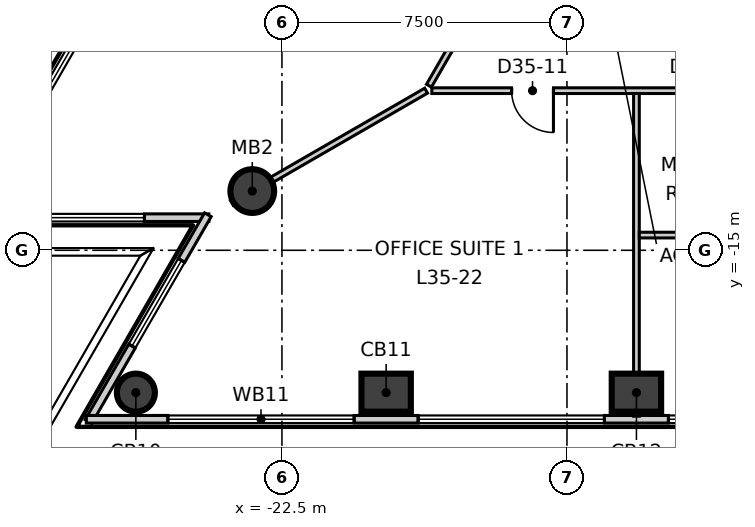
"""IFC4 building model, lengths in metres.
Left out: names, types, materials, properties, quantities, classifications, styles, units other than length and angle.
Written with IfcOpenShell. Run it as: python <this file> out.ifc"""

import sys

from ifc_helpers import new_model, si_unit, direction, frame, frame_2d, origin, origin_2d, place, context, subcontext, project, spatial, rectangle, circle, extrude, element, fill, save


model = new_model("IFC4")
c1 = context("Model", 3, precision=1e-05, world=origin(), true_north=direction((0.0, 1.0)))
c2 = subcontext(c1, "Body", "Model", "MODEL_VIEW")
j1 = project(units=[si_unit("LENGTHUNIT", "METRE"), si_unit("PLANEANGLEUNIT", "RADIAN")], contexts=[c1])
p1 = place(None, origin())
s1 = spatial("IfcSite", under=j1, at=p1, CompositionType="ELEMENT")
p2 = place(p1, origin())
s2 = spatial("IfcBuilding", under=s1, at=p2, CompositionType="ELEMENT")
p3 = place(p2, frame((0.0, 0.0, 152.3)))
s3 = spatial("IfcBuildingStorey", under=s2, at=p3, CompositionType="ELEMENT", Elevation=152.3)
p4 = place(p3, frame((-26.344, -18.746, -0.3), z_axis=(0.0, 0.0, 1.0), x_axis=(1.0, 0.0, 0.0)))
e1 = element("IfcColumn", 1, at=p4, inside=s3, PredefinedType="COLUMN", context=c2, shape_type="SweptSolid", body=[
    extrude(circle(Radius=0.5, at=origin_2d()), origin(), (0.0, 0.0, 1.0), 4.0),
])
for number, where, z_axis, x_axis in (
    (2, (-19.758, -18.746, -0.3), (0.0, 0.0, 1.0), (1.0, 0.0, 0.0)),
    (3, (-13.172, -18.746, -0.3), (0.0, 0.0, 1.0), (1.0, 0.0, 0.0)),
):
    element("IfcColumn", number, at=place(p3, frame(where, z_axis=z_axis, x_axis=x_axis)), inside=s3, PredefinedType="COLUMN", context=c2, shape_type="SweptSolid", body=[
        extrude(rectangle(XDim=1.3, YDim=1.0, at=origin_2d()), origin(), (0.0, 0.0, 1.0), 4.0),
    ])
p5 = place(p3, frame((-23.281, -13.442, -0.3), z_axis=(0.0, 0.0, 1.0), x_axis=(1.0, 0.0, 0.0)))
e4 = element("IfcColumn", 4, at=p5, inside=s3, PredefinedType="COLUMN", context=c2, shape_type="SweptSolid", body=[
    extrude(circle(Radius=0.575, at=origin_2d()), origin(), (0.0, 0.0, 1.0), 4.0),
])
p6 = place(p3, frame((-3.018, 33.666, 0.0), z_axis=(0.0, 0.0, 1.0), x_axis=(-0.499984613623, -0.866034286931, 0.0)))
e5 = element("IfcWall", 5, at=p6, inside=s3, PredefinedType="ELEMENTEDWALL", context=c2, shape_type="SweptSolid", body=[
    extrude(rectangle(XDim=55.274, YDim=0.2, at=frame_2d((27.637, 0.0))), origin(), (0.0, 0.0, 1.0), 3.7),
])
p7 = place(p6, frame((2.145, 0.0, 0.9)))
e6 = element("IfcOpeningElement", 6, at=p7, cuts=e5, PredefinedType="OPENING", context=c2, shape_type="SweptSolid", body=[
    extrude(rectangle(XDim=4.9, YDim=2.5, at=frame_2d((2.45, 1.25))), frame((0.0, 0.11, 0.0), z_axis=(0.0, -1.0, 0.0), x_axis=(1.0, 0.0, 0.0)), (0.0, 0.0, 1.0), 0.22),
])
p8 = place(p6, frame((8.731, 0.0, 0.9)))
e7 = element("IfcOpeningElement", 7, at=p8, cuts=e5, PredefinedType="OPENING", context=c2, shape_type="SweptSolid", body=[
    extrude(rectangle(XDim=4.9, YDim=2.5, at=frame_2d((2.45, 1.25))), frame((0.0, 0.11, 0.0), z_axis=(0.0, -1.0, 0.0), x_axis=(1.0, 0.0, 0.0)), (0.0, 0.0, 1.0), 0.22),
])
p9 = place(p6, frame((15.318, 0.0, 0.9)))
e8 = element("IfcOpeningElement", 8, at=p9, cuts=e5, PredefinedType="OPENING", context=c2, shape_type="SweptSolid", body=[
    extrude(rectangle(XDim=4.9, YDim=2.5, at=frame_2d((2.45, 1.25))), frame((0.0, 0.11, 0.0), z_axis=(0.0, -1.0, 0.0), x_axis=(1.0, 0.0, 0.0)), (0.0, 0.0, 1.0), 0.22),
])
p10 = place(p6, frame((21.904, 0.0, 0.9)))
e9 = element("IfcOpeningElement", 9, at=p10, cuts=e5, PredefinedType="OPENING", context=c2, shape_type="SweptSolid", body=[
    extrude(rectangle(XDim=4.9, YDim=2.5, at=frame_2d((2.45, 1.25))), frame((0.0, 0.11, 0.0), z_axis=(0.0, -1.0, 0.0), x_axis=(1.0, 0.0, 0.0)), (0.0, 0.0, 1.0), 0.22),
])
p11 = place(p6, frame((28.49, 0.0, 0.9)))
e10 = element("IfcOpeningElement", 10, at=p11, cuts=e5, PredefinedType="OPENING", context=c2, shape_type="SweptSolid", body=[
    extrude(rectangle(XDim=4.9, YDim=2.5, at=frame_2d((2.45, 1.25))), frame((0.0, 0.11, 0.0), z_axis=(0.0, -1.0, 0.0), x_axis=(1.0, 0.0, 0.0)), (0.0, 0.0, 1.0), 0.22),
])
p12 = place(p6, frame((35.076, 0.0, 0.9)))
e11 = element("IfcOpeningElement", 11, at=p12, cuts=e5, PredefinedType="OPENING", context=c2, shape_type="SweptSolid", body=[
    extrude(rectangle(XDim=4.9, YDim=2.5, at=frame_2d((2.45, 1.25))), frame((0.0, 0.11, 0.0), z_axis=(0.0, -1.0, 0.0), x_axis=(1.0, 0.0, 0.0)), (0.0, 0.0, 1.0), 0.22),
])
p13 = place(p6, frame((41.662, 0.0, 0.9)))
e12 = element("IfcOpeningElement", 12, at=p13, cuts=e5, PredefinedType="OPENING", context=c2, shape_type="SweptSolid", body=[
    extrude(rectangle(XDim=4.9, YDim=2.5, at=frame_2d((2.45, 1.25))), frame((0.0, 0.11, 0.0), z_axis=(0.0, -1.0, 0.0), x_axis=(1.0, 0.0, 0.0)), (0.0, 0.0, 1.0), 0.22),
])
p14 = place(p6, frame((48.248, 0.0, 0.9)))
e13 = element("IfcOpeningElement", 13, at=p14, cuts=e5, PredefinedType="OPENING", context=c2, shape_type="SweptSolid", body=[
    extrude(rectangle(XDim=4.9, YDim=2.5, at=frame_2d((2.45, 1.25))), frame((0.0, 0.11, 0.0), z_axis=(0.0, -1.0, 0.0), x_axis=(1.0, 0.0, 0.0)), (0.0, 0.0, 1.0), 0.22),
])
p15 = place(p3, frame((-30.709, -14.142, 0.0), z_axis=(0.0, 0.0, 1.0), x_axis=(1.0, 0.0, 0.0)))
e14 = element("IfcWall", 14, at=p15, inside=s3, PredefinedType="ELEMENTEDWALL", context=c2, shape_type="SweptSolid", body=[
    extrude(rectangle(XDim=6.285, YDim=0.2, at=frame_2d((3.143, 0.0))), origin(), (0.0, 0.0, 1.0), 3.7),
])
p16 = place(p15, frame((1.99, 0.0, 0.9)))
e15 = element("IfcOpeningElement", 15, at=p16, cuts=e14, PredefinedType="OPENING", context=c2, shape_type="SweptSolid", body=[
    extrude(rectangle(XDim=2.6, YDim=2.5, at=frame_2d((1.3, 1.25))), frame((0.0, 0.11, 0.0), z_axis=(0.0, -1.0, 0.0), x_axis=(1.0, 0.0, 0.0)), (0.0, 0.0, 1.0), 0.22),
])
p17 = place(p3, frame((-24.449, -14.064, 0.0), z_axis=(0.0, 0.0, 1.0), x_axis=(-0.500057556061, -0.865992171227, 0.0)))
e16 = element("IfcWall", 16, at=p17, inside=s3, PredefinedType="ELEMENTEDWALL", context=c2, shape_type="SweptSolid", body=[
    extrude(rectangle(XDim=6.285, YDim=0.2, at=frame_2d((3.143, 0.0))), origin(), (0.0, 0.0, 1.0), 3.7),
])
p18 = place(p17, frame((1.39, 0.0, 0.9)))
e17 = element("IfcOpeningElement", 17, at=p18, cuts=e16, PredefinedType="OPENING", context=c2, shape_type="SweptSolid", body=[
    extrude(rectangle(XDim=2.6, YDim=2.5, at=frame_2d((1.3, 1.25))), frame((0.0, 0.11, 0.0), z_axis=(0.0, -1.0, 0.0), x_axis=(1.0, 0.0, 0.0)), (0.0, 0.0, 1.0), 0.22),
])
p19 = place(p3, frame((-27.647, -19.446, 0.0), z_axis=(0.0, 0.0, 1.0), x_axis=(1.0, 0.0, 0.0)))
e18 = element("IfcWall", 18, at=p19, inside=s3, PredefinedType="ELEMENTEDWALL", context=c2, shape_type="SweptSolid", body=[
    extrude(rectangle(XDim=55.274, YDim=0.2, at=frame_2d((27.637, 0.0))), origin(), (0.0, 0.0, 1.0), 3.7),
])
p20 = place(p19, frame((2.146, 0.0, 0.9)))
e19 = element("IfcOpeningElement", 19, at=p20, cuts=e18, PredefinedType="OPENING", context=c2, shape_type="SweptSolid", body=[
    extrude(rectangle(XDim=4.9, YDim=2.5, at=frame_2d((2.45, 1.25))), frame((0.0, 0.11, 0.0), z_axis=(0.0, -1.0, 0.0), x_axis=(1.0, 0.0, 0.0)), (0.0, 0.0, 1.0), 0.22),
])
p21 = place(p19, frame((8.732, 0.0, 0.9)))
e20 = element("IfcOpeningElement", 20, at=p21, cuts=e18, PredefinedType="OPENING", context=c2, shape_type="SweptSolid", body=[
    extrude(rectangle(XDim=4.9, YDim=2.5, at=frame_2d((2.45, 1.25))), frame((0.0, 0.11, 0.0), z_axis=(0.0, -1.0, 0.0), x_axis=(1.0, 0.0, 0.0)), (0.0, 0.0, 1.0), 0.22),
])
p22 = place(p19, frame((15.318, 0.0, 0.9)))
e21 = element("IfcOpeningElement", 21, at=p22, cuts=e18, PredefinedType="OPENING", context=c2, shape_type="SweptSolid", body=[
    extrude(rectangle(XDim=4.9, YDim=2.5, at=frame_2d((2.45, 1.25))), frame((0.0, 0.11, 0.0), z_axis=(0.0, -1.0, 0.0), x_axis=(1.0, 0.0, 0.0)), (0.0, 0.0, 1.0), 0.22),
])
p23 = place(p19, frame((21.904, 0.0, 0.9)))
e22 = element("IfcOpeningElement", 22, at=p23, cuts=e18, PredefinedType="OPENING", context=c2, shape_type="SweptSolid", body=[
    extrude(rectangle(XDim=4.9, YDim=2.5, at=frame_2d((2.45, 1.25))), frame((0.0, 0.11, 0.0), z_axis=(0.0, -1.0, 0.0), x_axis=(1.0, 0.0, 0.0)), (0.0, 0.0, 1.0), 0.22),
])
p24 = place(p19, frame((28.49, 0.0, 0.9)))
e23 = element("IfcOpeningElement", 23, at=p24, cuts=e18, PredefinedType="OPENING", context=c2, shape_type="SweptSolid", body=[
    extrude(rectangle(XDim=4.9, YDim=2.5, at=frame_2d((2.45, 1.25))), frame((0.0, 0.11, 0.0), z_axis=(0.0, -1.0, 0.0), x_axis=(1.0, 0.0, 0.0)), (0.0, 0.0, 1.0), 0.22),
])
p25 = place(p19, frame((35.076, 0.0, 0.9)))
e24 = element("IfcOpeningElement", 24, at=p25, cuts=e18, PredefinedType="OPENING", context=c2, shape_type="SweptSolid", body=[
    extrude(rectangle(XDim=4.9, YDim=2.5, at=frame_2d((2.45, 1.25))), frame((0.0, 0.11, 0.0), z_axis=(0.0, -1.0, 0.0), x_axis=(1.0, 0.0, 0.0)), (0.0, 0.0, 1.0), 0.22),
])
p26 = place(p19, frame((41.662, 0.0, 0.9)))
e25 = element("IfcOpeningElement", 25, at=p26, cuts=e18, PredefinedType="OPENING", context=c2, shape_type="SweptSolid", body=[
    extrude(rectangle(XDim=4.9, YDim=2.5, at=frame_2d((2.45, 1.25))), frame((0.0, 0.11, 0.0), z_axis=(0.0, -1.0, 0.0), x_axis=(1.0, 0.0, 0.0)), (0.0, 0.0, 1.0), 0.22),
])
p27 = place(p19, frame((48.248, 0.0, 0.9)))
e26 = element("IfcOpeningElement", 26, at=p27, cuts=e18, PredefinedType="OPENING", context=c2, shape_type="SweptSolid", body=[
    extrude(rectangle(XDim=4.9, YDim=2.5, at=frame_2d((2.45, 1.25))), frame((0.0, 0.11, 0.0), z_axis=(0.0, -1.0, 0.0), x_axis=(1.0, 0.0, 0.0)), (0.0, 0.0, 1.0), 0.22),
])
p28 = place(p3, frame((-23.818, -13.752, 0.0), z_axis=(0.0, 0.0, 1.0), x_axis=(0.8659920435, 0.500057777256, 0.0)))
e27 = element("IfcWall", 27, at=p28, inside=s3, PredefinedType="PARTITIONING", context=c2, shape_type="SweptSolid", body=[
    extrude(rectangle(XDim=5.903, YDim=0.15, at=frame_2d((2.952, 0.0))), origin(), (0.0, 0.0, 1.0), 3.2),
])
p29 = place(p3, frame((-18.556, -10.8, 0.0), z_axis=(0.0, 0.0, 1.0), x_axis=(1.0, 0.0, 0.0)))
e28 = element("IfcWall", 28, at=p29, inside=s3, PredefinedType="PARTITIONING", context=c2, shape_type="SweptSolid", body=[
    extrude(rectangle(XDim=17.655, YDim=0.15, at=frame_2d((8.828, 0.0))), origin(), (0.0, 0.0, 1.0), 3.7),
])
p30 = place(p29, frame((2.1, 0.0, 0.0)))
e29 = element("IfcOpeningElement", 29, at=p30, cuts=e28, PredefinedType="OPENING", context=c2, shape_type="SweptSolid", body=[
    extrude(rectangle(XDim=1.1, YDim=2.1, at=frame_2d((0.55, 1.05))), frame((0.0, 0.085, 0.0), z_axis=(0.0, -1.0, 0.0), x_axis=(1.0, 0.0, 0.0)), (0.0, 0.0, 1.0), 0.17),
])
p31 = place(p29, frame((13.934, 0.0, 0.0)))
e30 = element("IfcOpeningElement", 30, at=p31, cuts=e28, PredefinedType="OPENING", context=c2, shape_type="SweptSolid", body=[
    extrude(rectangle(XDim=1.1, YDim=2.1, at=frame_2d((0.55, 1.05))), frame((0.0, 0.085, 0.0), z_axis=(0.0, -1.0, 0.0), x_axis=(1.0, 0.0, 0.0)), (0.0, 0.0, 1.0), 0.17),
])
p32 = place(p29, frame((6.734, 0.0, 0.0)))
e31 = element("IfcOpeningElement", 31, at=p32, cuts=e28, PredefinedType="OPENING", context=c2, shape_type="SweptSolid", body=[
    extrude(rectangle(XDim=0.9, YDim=2.1, at=frame_2d((0.45, 1.05))), frame((0.0, 0.085, 0.0), z_axis=(0.0, -1.0, 0.0), x_axis=(1.0, 0.0, 0.0)), (0.0, 0.0, 1.0), 0.17),
])
p33 = place(p29, frame((9.734, 0.0, 0.0)))
e32 = element("IfcOpeningElement", 32, at=p33, cuts=e28, PredefinedType="OPENING", context=c2, shape_type="SweptSolid", body=[
    extrude(rectangle(XDim=0.9, YDim=2.1, at=frame_2d((0.45, 1.05))), frame((0.0, 0.085, 0.0), z_axis=(0.0, -1.0, 0.0), x_axis=(1.0, 0.0, 0.0)), (0.0, 0.0, 1.0), 0.17),
])
p34 = place(p3, frame((-18.631, -10.67, 0.0), z_axis=(0.0, 0.0, 1.0), x_axis=(0.500017706633, 0.866015180614, 0.0)))
e33 = element("IfcWall", 33, at=p34, inside=s3, PredefinedType="PARTITIONING", context=c2, shape_type="SweptSolid", body=[
    extrude(rectangle(XDim=17.656, YDim=0.15, at=frame_2d((8.828, 0.0))), origin(), (0.0, 0.0, 1.0), 3.7),
])
p35 = place(p34, frame((6.606, 0.0, 0.0)))
e34 = element("IfcOpeningElement", 34, at=p35, cuts=e33, PredefinedType="OPENING", context=c2, shape_type="SweptSolid", body=[
    extrude(rectangle(XDim=1.1, YDim=2.1, at=frame_2d((0.55, 1.05))), frame((0.0, 0.085, 0.0), z_axis=(0.0, -1.0, 0.0), x_axis=(1.0, 0.0, 0.0)), (0.0, 0.0, 1.0), 0.17),
])
p36 = place(p34, frame((12.406, 0.0, 0.0)))
e35 = element("IfcOpeningElement", 35, at=p36, cuts=e33, PredefinedType="OPENING", context=c2, shape_type="SweptSolid", body=[
    extrude(rectangle(XDim=0.9, YDim=2.1, at=frame_2d((0.45, 1.05))), frame((0.0, 0.085, 0.0), z_axis=(0.0, -1.0, 0.0), x_axis=(1.0, 0.0, 0.0)), (0.0, 0.0, 1.0), 0.17),
])
p37 = place(p34, frame((9.606, 0.0, 0.0)))
e36 = element("IfcOpeningElement", 36, at=p37, cuts=e33, PredefinedType="OPENING", context=c2, shape_type="SweptSolid", body=[
    extrude(rectangle(XDim=1.0, YDim=2.1, at=frame_2d((0.5, 1.05))), frame((0.0, 0.085, 0.0), z_axis=(0.0, -1.0, 0.0), x_axis=(1.0, 0.0, 0.0)), (0.0, 0.0, 1.0), 0.17),
])
p38 = place(p34, frame((2.034, 0.0, 0.0)))
e37 = element("IfcOpeningElement", 37, at=p38, cuts=e33, PredefinedType="OPENING", context=c2, shape_type="SweptSolid", body=[
    extrude(rectangle(XDim=1.1, YDim=2.1, at=frame_2d((0.55, 1.05))), frame((0.0, 0.085, 0.0), z_axis=(0.0, -1.0, 0.0), x_axis=(1.0, 0.0, 0.0)), (0.0, 0.0, 1.0), 0.17),
])
p39 = place(p3, frame((-13.172, -19.366, 0.0), z_axis=(0.0, 0.0, 1.0), x_axis=(0.0, 1.0, 0.0)))
e38 = element("IfcWall", 38, at=p39, inside=s3, PredefinedType="PARTITIONING", context=c2, shape_type="SweptSolid", body=[
    extrude(rectangle(XDim=8.491, YDim=0.15, at=frame_2d((4.246, 0.0))), origin(), (0.0, 0.0, 1.0), 3.7),
])
p40 = place(p3, frame((-13.097, -14.6, 0.0), z_axis=(0.0, 0.0, 1.0), x_axis=(1.0, 0.0, 0.0)))
e39 = element("IfcWall", 39, at=p40, inside=s3, PredefinedType="PARTITIONING", context=c2, shape_type="SweptSolid", body=[
    extrude(rectangle(XDim=3.525, YDim=0.15, at=frame_2d((1.762, 0.0))), origin(), (0.0, 0.0, 1.0), 3.7),
])
p41 = place(p14, origin())
e40 = element("IfcWindow", 40, at=p41, inside=s3, PartitioningType="SINGLE_PANEL", PredefinedType="WINDOW", context=c2, shape_type="SweptSolid", body=[
    extrude(rectangle(XDim=4.9, YDim=2.5, at=frame_2d((2.45, 1.25))), frame((0.0, 0.03, 0.0), z_axis=(0.0, -1.0, 0.0), x_axis=(1.0, 0.0, 0.0)), (0.0, 0.0, 1.0), 0.06),
])
fill(e13, e40)
p42 = place(p16, origin())
e41 = element("IfcWindow", 41, at=p42, inside=s3, PartitioningType="SINGLE_PANEL", PredefinedType="WINDOW", context=c2, shape_type="SweptSolid", body=[
    extrude(rectangle(XDim=2.6, YDim=2.5, at=frame_2d((1.3, 1.25))), frame((0.0, 0.03, 0.0), z_axis=(0.0, -1.0, 0.0), x_axis=(1.0, 0.0, 0.0)), (0.0, 0.0, 1.0), 0.06),
])
fill(e15, e41)
p43 = place(p18, origin())
e42 = element("IfcWindow", 42, at=p43, inside=s3, PartitioningType="SINGLE_PANEL", PredefinedType="WINDOW", context=c2, shape_type="SweptSolid", body=[
    extrude(rectangle(XDim=2.6, YDim=2.5, at=frame_2d((1.3, 1.25))), frame((0.0, 0.03, 0.0), z_axis=(0.0, -1.0, 0.0), x_axis=(1.0, 0.0, 0.0)), (0.0, 0.0, 1.0), 0.06),
])
fill(e17, e42)
p44 = place(p20, origin())
e43 = element("IfcWindow", 43, at=p44, inside=s3, PartitioningType="SINGLE_PANEL", PredefinedType="WINDOW", context=c2, shape_type="SweptSolid", body=[
    extrude(rectangle(XDim=4.9, YDim=2.5, at=frame_2d((2.45, 1.25))), frame((0.0, 0.03, 0.0), z_axis=(0.0, -1.0, 0.0), x_axis=(1.0, 0.0, 0.0)), (0.0, 0.0, 1.0), 0.06),
])
fill(e19, e43)
p45 = place(p21, origin())
e44 = element("IfcWindow", 44, at=p45, inside=s3, PartitioningType="SINGLE_PANEL", PredefinedType="WINDOW", context=c2, shape_type="SweptSolid", body=[
    extrude(rectangle(XDim=4.9, YDim=2.5, at=frame_2d((2.45, 1.25))), frame((0.0, 0.03, 0.0), z_axis=(0.0, -1.0, 0.0), x_axis=(1.0, 0.0, 0.0)), (0.0, 0.0, 1.0), 0.06),
])
fill(e20, e44)
p46 = place(p22, origin())
e45 = element("IfcWindow", 45, at=p46, inside=s3, PartitioningType="SINGLE_PANEL", PredefinedType="WINDOW", context=c2, shape_type="SweptSolid", body=[
    extrude(rectangle(XDim=4.9, YDim=2.5, at=frame_2d((2.45, 1.25))), frame((0.0, 0.03, 0.0), z_axis=(0.0, -1.0, 0.0), x_axis=(1.0, 0.0, 0.0)), (0.0, 0.0, 1.0), 0.06),
])
fill(e21, e45)
p47 = place(p30, origin())
e46 = element("IfcDoor", 46, at=p47, inside=s3, OperationType="SINGLE_SWING_RIGHT", PredefinedType="DOOR", context=c2, shape_type="SweptSolid", body=[
    extrude(rectangle(XDim=1.1, YDim=2.1, at=frame_2d((0.55, 1.05))), frame((0.0, 0.025, 0.0), z_axis=(0.0, -1.0, 0.0), x_axis=(1.0, 0.0, 0.0)), (0.0, 0.0, 1.0), 0.05),
])
fill(e29, e46)
save(model, sys.argv[1])
